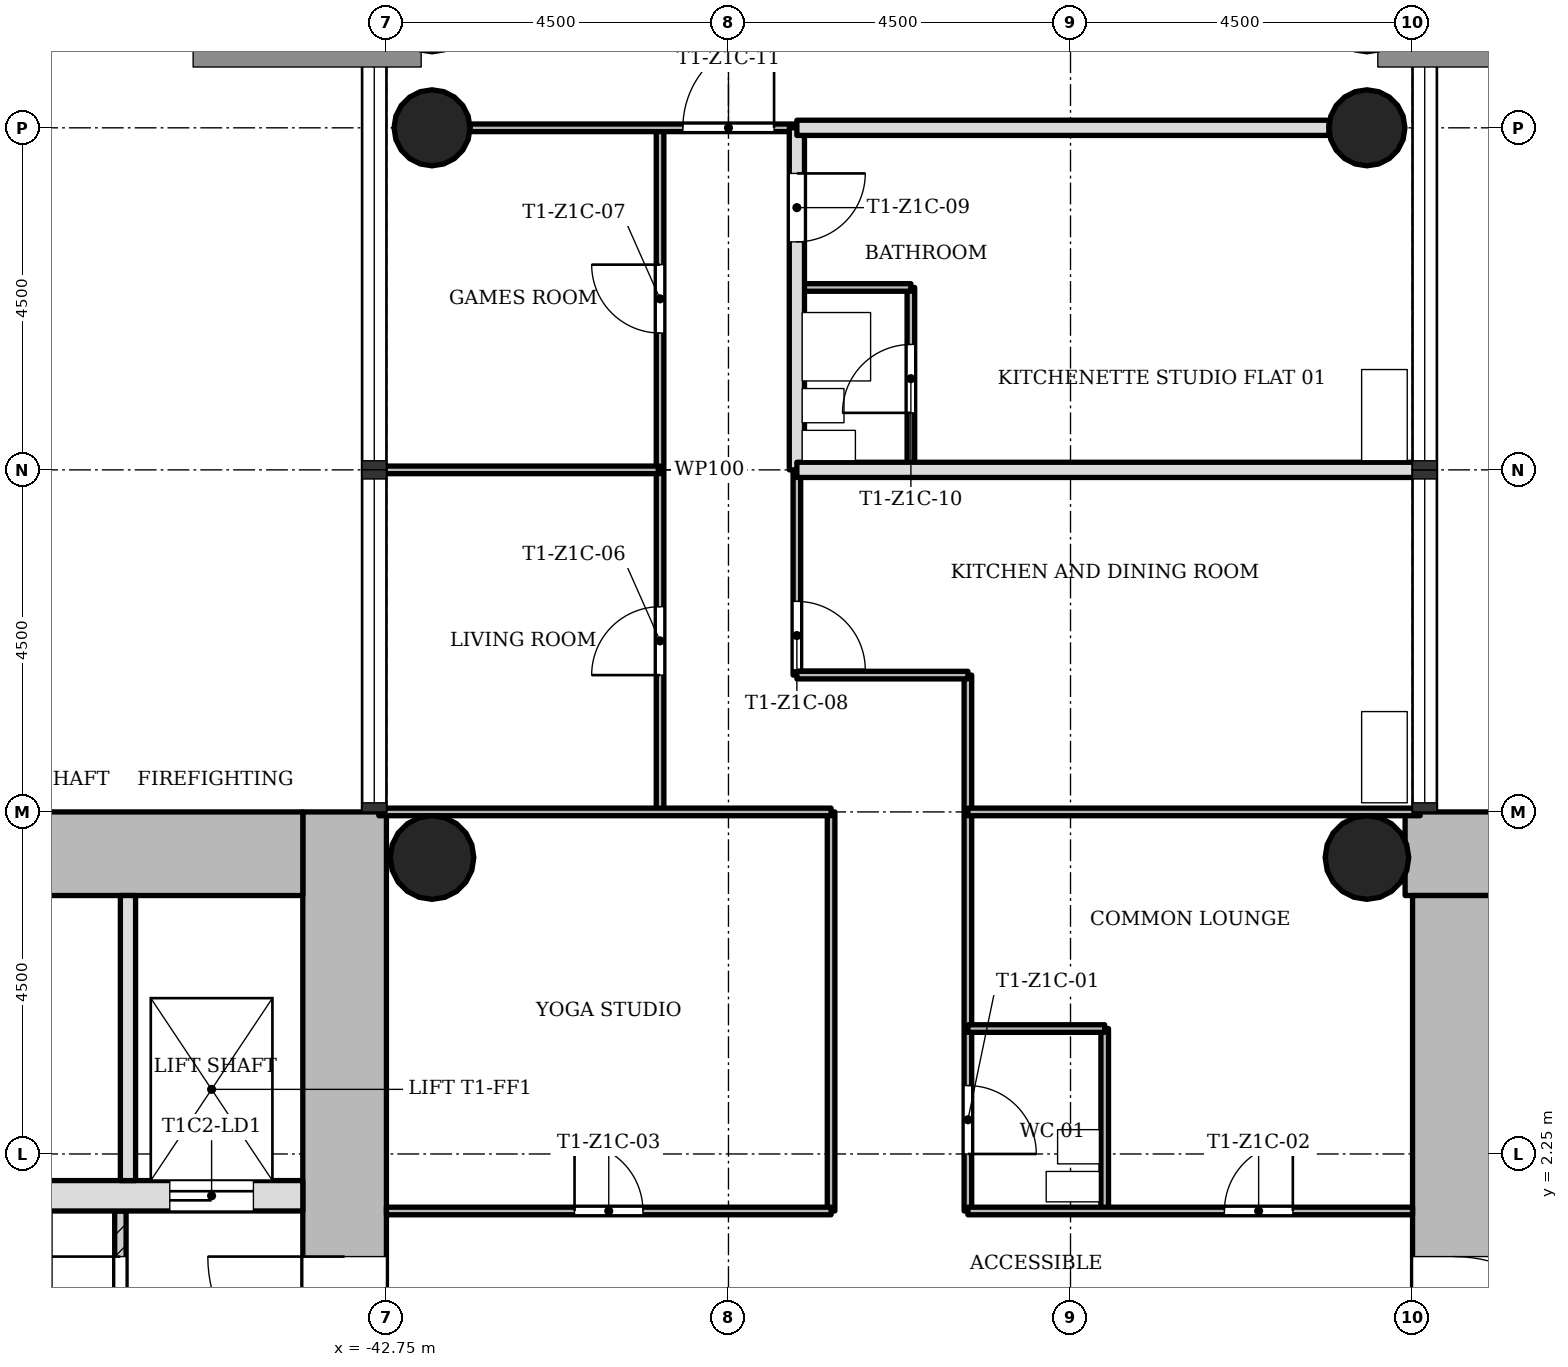
"""IFC4 building model, lengths in metres.
Left out: names, types, materials, properties, quantities, classifications, styles, units other than length and angle.
Written with IfcOpenShell. Run it as: python <this file> out.ifc"""

import sys

from ifc_helpers import new_model, si_unit, direction, frame, frame_2d, origin, origin_2d, place, context, subcontext, project, spatial, rectangle, hollow_circle, extrude, element, fill, save


model = new_model("IFC4")
c1 = context("Model", 3, precision=1e-05, world=origin(), true_north=direction((0.0, 1.0)))
c2 = subcontext(c1, "Body", "Model", "MODEL_VIEW")
j1 = project(units=[si_unit("LENGTHUNIT", "METRE"), si_unit("PLANEANGLEUNIT", "RADIAN")], contexts=[c1])
p1 = place(None, origin())
s1 = spatial("IfcSite", under=j1, at=p1, CompositionType="ELEMENT")
p2 = place(p1, origin())
s2 = spatial("IfcBuilding", under=s1, at=p2, CompositionType="ELEMENT")
p3 = place(p2, frame((0.0, 0.0, 44.9)))
s3 = spatial("IfcBuildingStorey", under=s2, at=p3, CompositionType="ELEMENT", Elevation=44.9)
p4 = place(p3, frame((-21.35, 6.2, 0.0), z_axis=(0.0, 0.0, 1.0), x_axis=(-1.0, 0.0, 0.0)))
e1 = element("IfcWall", 1, at=p4, inside=s3, PredefinedType="SHEAR", context=c2, shape_type="SweptSolid", body=[
    extrude(rectangle(XDim=7.998, YDim=1.1, at=frame_2d((3.999, 0.0))), origin(), (0.0, 0.0, 1.0), 3.4),
])
p5 = place(p3, frame((-28.7, 5.65, 0.0), z_axis=(0.0, 0.0, 1.0), x_axis=(0.0, -1.0, 0.0)))
e2 = element("IfcWall", 2, at=p5, inside=s3, PredefinedType="SHEAR", context=c2, shape_type="SweptSolid", body=[
    extrude(rectangle(XDim=12.4, YDim=1.1, at=frame_2d((6.2, 0.0))), origin(), (0.0, 0.0, 1.0), 3.4),
])
p6 = place(p5, frame((4.75, 0.0, 0.0)))
e3 = element("IfcOpeningElement", 3, at=p6, cuts=e2, PredefinedType="OPENING", context=c2, shape_type="SweptSolid", body=[
    extrude(rectangle(XDim=1.8, YDim=2.1, at=frame_2d((0.9, 1.05))), frame((0.0, 0.56, 0.0), z_axis=(0.0, -1.0, 0.0), x_axis=(1.0, 0.0, 0.0)), (0.0, 0.0, 1.0), 1.12),
])
p7 = place(p3, frame((-43.3, -5.65, 0.0), z_axis=(0.0, 0.0, 1.0), x_axis=(0.0, 1.0, 0.0)))
e4 = element("IfcWall", 4, at=p7, inside=s3, PredefinedType="SHEAR", context=c2, shape_type="SweptSolid", body=[
    extrude(rectangle(XDim=12.4, YDim=1.1, at=frame_2d((6.2, 0.0))), origin(), (0.0, 0.0, 1.0), 3.4),
])
p8 = place(p7, frame((4.75, 0.0, 0.0)))
e5 = element("IfcOpeningElement", 5, at=p8, cuts=e4, PredefinedType="OPENING", context=c2, shape_type="SweptSolid", body=[
    extrude(rectangle(XDim=1.8, YDim=2.1, at=frame_2d((0.9, 1.05))), frame((0.0, 0.56, 0.0), z_axis=(0.0, -1.0, 0.0), x_axis=(1.0, 0.0, 0.0)), (0.0, 0.0, 1.0), 1.12),
])
p9 = place(p3, frame((-43.85, 6.2, 0.0), z_axis=(0.0, 0.0, 1.0), x_axis=(-1.0, 0.0, 0.0)))
e6 = element("IfcWall", 6, at=p9, inside=s3, PredefinedType="SHEAR", context=c2, shape_type="SweptSolid", body=[
    extrude(rectangle(XDim=7.9, YDim=1.1, at=frame_2d((3.95, 0.0))), origin(), (0.0, 0.0, 1.0), 3.4),
])
p10 = place(p3, frame((-50.65, 1.7, 0.0), z_axis=(0.0, 0.0, 1.0), x_axis=(1.0, 0.0, 0.0)))
e7 = element("IfcWall", 7, at=p10, inside=s3, PredefinedType="SHEAR", context=c2, shape_type="SweptSolid", body=[
    extrude(rectangle(XDim=6.8, YDim=0.4, at=frame_2d((3.4, 0.0))), origin(), (0.0, 0.0, 1.0), 3.4),
])
p11 = place(p10, frame((5.05, 0.0, 0.0)))
e8 = element("IfcOpeningElement", 8, at=p11, cuts=e7, PredefinedType="OPENING", context=c2, shape_type="SweptSolid", body=[
    extrude(rectangle(XDim=1.1, YDim=2.1, at=frame_2d((0.55, 1.05))), frame((0.0, 0.21, 0.0), z_axis=(0.0, -1.0, 0.0), x_axis=(1.0, 0.0, 0.0)), (0.0, 0.0, 1.0), 0.42),
])
for number, where, z_axis, x_axis in (
    (9, (-29.85, 15.75, 0.0), (0.0, 0.0, 1.0), (1.0, 0.0, 0.0)),
    (10, (-42.15, 15.75, 0.0), (0.0, 0.0, 1.0), (1.0, 0.0, 0.0)),
):
    element("IfcColumn", number, at=place(p3, frame(where, z_axis=z_axis, x_axis=x_axis)), inside=s3, PredefinedType="COLUMN", context=c2, shape_type="SweptSolid", body=[
        extrude(hollow_circle(Radius=0.5, WallThickness=0.036, at=origin_2d()), origin(), (0.0, 0.0, 1.0), 3.4),
    ])
for number, where, z_axis, x_axis in (
    (11, (-29.85, 6.15, 0.0), (0.0, 0.0, 1.0), (1.0, 0.0, 0.0)),
    (12, (-42.15, 6.15, 0.0), (0.0, 0.0, 1.0), (1.0, 0.0, 0.0)),
):
    element("IfcColumn", number, at=place(p3, frame(where, z_axis=z_axis, x_axis=x_axis)), inside=s3, PredefinedType="COLUMN", context=c2, shape_type="SweptSolid", body=[
        extrude(hollow_circle(Radius=0.55, WallThickness=0.04, at=origin_2d()), origin(), (0.0, 0.0, 1.0), 3.4),
    ])
p12 = place(p3, frame((-46.25, 1.5, 0.0), z_axis=(0.0, 0.0, 1.0), x_axis=(0.0, -1.0, 0.0)))
e13 = element("IfcWall", 13, at=p12, inside=s3, PredefinedType="PARTITIONING", context=c2, shape_type="SweptSolid", body=[
    extrude(rectangle(XDim=3.0, YDim=0.15, at=frame_2d((1.5, 0.0))), origin(), (0.0, 0.0, 1.0), 3.0),
])
p13 = place(p12, frame((0.6, 0.0, 0.0)))
e14 = element("IfcOpeningElement", 14, at=p13, cuts=e13, PredefinedType="OPENING", context=c2, shape_type="SweptSolid", body=[
    extrude(rectangle(XDim=1.8, YDim=2.1, at=frame_2d((0.9, 1.05))), frame((0.0, 0.085, 0.0), z_axis=(0.0, -1.0, 0.0), x_axis=(1.0, 0.0, 0.0)), (0.0, 0.0, 1.0), 0.17),
])
p14 = place(p3, frame((-46.15, 5.65, 0.0), z_axis=(0.0, 0.0, 1.0), x_axis=(0.0, -1.0, 0.0)))
e15 = element("IfcWall", 15, at=p14, inside=s3, PredefinedType="SOLIDWALL", context=c2, shape_type="SweptSolid", body=[
    extrude(rectangle(XDim=3.75, YDim=0.2, at=frame_2d((1.875, 0.0))), origin(), (0.0, 0.0, 1.0), 3.0),
])
p15 = place(p3, frame((-39.15, 6.75, 0.0), z_axis=(0.0, 0.0, 1.0), x_axis=(0.0, 1.0, 0.0)))
e16 = element("IfcWall", 16, at=p15, inside=s3, PredefinedType="PARTITIONING", context=c2, shape_type="SweptSolid", body=[
    extrude(rectangle(XDim=9.0, YDim=0.1, at=frame_2d((4.5, 0.0))), origin(), (0.0, 0.0, 1.0), 3.0),
])
p16 = place(p15, frame((1.8, 0.0, 0.0)))
e17 = element("IfcOpeningElement", 17, at=p16, cuts=e16, PredefinedType="OPENING", context=c2, shape_type="SweptSolid", body=[
    extrude(rectangle(XDim=0.9, YDim=2.1, at=frame_2d((0.45, 1.05))), frame((0.0, 0.06, 0.0), z_axis=(0.0, -1.0, 0.0), x_axis=(1.0, 0.0, 0.0)), (0.0, 0.0, 1.0), 0.12),
])
p17 = place(p15, frame((6.3, 0.0, 0.0)))
e18 = element("IfcOpeningElement", 18, at=p17, cuts=e16, PredefinedType="OPENING", context=c2, shape_type="SweptSolid", body=[
    extrude(rectangle(XDim=0.9, YDim=2.1, at=frame_2d((0.45, 1.05))), frame((0.0, 0.06, 0.0), z_axis=(0.0, -1.0, 0.0), x_axis=(1.0, 0.0, 0.0)), (0.0, 0.0, 1.0), 0.12),
])
p18 = place(p3, frame((-37.35, 8.55, 0.0), z_axis=(0.0, 0.0, 1.0), x_axis=(0.0, 1.0, 0.0)))
e19 = element("IfcWall", 19, at=p18, inside=s3, PredefinedType="PARTITIONING", context=c2, shape_type="SweptSolid", body=[
    extrude(rectangle(XDim=2.7, YDim=0.1, at=frame_2d((1.35, 0.0))), origin(), (0.0, 0.0, 1.0), 3.0),
])
p19 = place(p18, frame((0.07, 0.0, 0.0)))
e20 = element("IfcOpeningElement", 20, at=p19, cuts=e19, PredefinedType="OPENING", context=c2, shape_type="SweptSolid", body=[
    extrude(rectangle(XDim=0.9, YDim=2.1, at=frame_2d((0.45, 1.05))), frame((0.0, 0.06, 0.0), z_axis=(0.0, -1.0, 0.0), x_axis=(1.0, 0.0, 0.0)), (0.0, 0.0, 1.0), 0.12),
])
p20 = place(p3, frame((-37.35, 11.25, 0.0), z_axis=(0.0, 0.0, 1.0), x_axis=(0.0, 1.0, 0.0)))
e21 = element("IfcWall", 21, at=p20, inside=s3, PredefinedType="SOLIDWALL", context=c2, shape_type="SweptSolid", body=[
    extrude(rectangle(XDim=4.5, YDim=0.2, at=frame_2d((2.25, 0.0))), origin(), (0.0, 0.0, 1.0), 3.0),
])
p21 = place(p20, frame((3.0, 0.0, 0.0)))
e22 = element("IfcOpeningElement", 22, at=p21, cuts=e21, PredefinedType="OPENING", context=c2, shape_type="SweptSolid", body=[
    extrude(rectangle(XDim=0.9, YDim=2.1, at=frame_2d((0.45, 1.05))), frame((0.0, 0.11, 0.0), z_axis=(0.0, -1.0, 0.0), x_axis=(1.0, 0.0, 0.0)), (0.0, 0.0, 1.0), 0.22),
])
p22 = place(p3, frame((-36.9, 1.5, 0.0), z_axis=(0.0, 0.0, 1.0), x_axis=(0.0, 1.0, 0.0)))
e23 = element("IfcWall", 23, at=p22, inside=s3, PredefinedType="PARTITIONING", context=c2, shape_type="SweptSolid", body=[
    extrude(rectangle(XDim=5.25, YDim=0.1, at=frame_2d((2.625, 0.0))), origin(), (0.0, 0.0, 1.0), 3.0),
])
p23 = place(p3, frame((-35.85, 11.25, 0.0), z_axis=(0.0, 0.0, 1.0), x_axis=(0.0, 1.0, 0.0)))
e24 = element("IfcWall", 24, at=p23, inside=s3, PredefinedType="PARTITIONING", context=c2, shape_type="SweptSolid", body=[
    extrude(rectangle(XDim=2.4, YDim=0.1, at=frame_2d((1.2, 0.0))), origin(), (0.0, 0.0, 1.0), 3.0),
])
p24 = place(p23, frame((0.75, 0.0, 0.0)))
e25 = element("IfcOpeningElement", 25, at=p24, cuts=e24, PredefinedType="OPENING", context=c2, shape_type="SweptSolid", body=[
    extrude(rectangle(XDim=0.9, YDim=2.1, at=frame_2d((0.45, 1.05))), frame((0.0, 0.06, 0.0), z_axis=(0.0, -1.0, 0.0), x_axis=(1.0, 0.0, 0.0)), (0.0, 0.0, 1.0), 0.12),
])
p25 = place(p3, frame((-35.1, 1.5, 0.0), z_axis=(0.0, 0.0, 1.0), x_axis=(0.0, 1.0, 0.0)))
e26 = element("IfcWall", 26, at=p25, inside=s3, PredefinedType="PARTITIONING", context=c2, shape_type="SweptSolid", body=[
    extrude(rectangle(XDim=7.05, YDim=0.1, at=frame_2d((3.525, 0.0))), origin(), (0.0, 0.0, 1.0), 3.0),
])
p26 = place(p25, frame((0.75, 0.0, 0.0)))
e27 = element("IfcOpeningElement", 27, at=p26, cuts=e26, PredefinedType="OPENING", context=c2, shape_type="SweptSolid", body=[
    extrude(rectangle(XDim=0.9, YDim=2.1, at=frame_2d((0.45, 1.05))), frame((0.0, 0.06, 0.0), z_axis=(0.0, -1.0, 0.0), x_axis=(1.0, 0.0, 0.0)), (0.0, 0.0, 1.0), 0.12),
])
p27 = place(p3, frame((-33.3, 1.5, 0.0), z_axis=(0.0, 0.0, 1.0), x_axis=(0.0, 1.0, 0.0)))
e28 = element("IfcWall", 28, at=p27, inside=s3, PredefinedType="PARTITIONING", context=c2, shape_type="SweptSolid", body=[
    extrude(rectangle(XDim=2.4, YDim=0.1, at=frame_2d((1.2, 0.0))), origin(), (0.0, 0.0, 1.0), 3.0),
])
p28 = place(p3, frame((-42.75, 1.5, 0.0), z_axis=(0.0, 0.0, 1.0), x_axis=(1.0, 0.0, 0.0)))
e29 = element("IfcWall", 29, at=p28, inside=s3, PredefinedType="PARTITIONING", context=c2, shape_type="SweptSolid", body=[
    extrude(rectangle(XDim=5.85, YDim=0.1, at=frame_2d((2.925, 0.0))), origin(), (0.0, 0.0, 1.0), 3.0),
])
p29 = place(p28, frame((2.475, 0.0, 0.0)))
e30 = element("IfcOpeningElement", 30, at=p29, cuts=e29, PredefinedType="OPENING", context=c2, shape_type="SweptSolid", body=[
    extrude(rectangle(XDim=0.9, YDim=2.1, at=frame_2d((0.45, 1.05))), frame((0.0, 0.06, 0.0), z_axis=(0.0, -1.0, 0.0), x_axis=(1.0, 0.0, 0.0)), (0.0, 0.0, 1.0), 0.12),
])
p30 = place(p3, frame((-35.1, 1.5, 0.0), z_axis=(0.0, 0.0, 1.0), x_axis=(1.0, 0.0, 0.0)))
e31 = element("IfcWall", 31, at=p30, inside=s3, PredefinedType="PARTITIONING", context=c2, shape_type="SweptSolid", body=[
    extrude(rectangle(XDim=5.85, YDim=0.1, at=frame_2d((2.925, 0.0))), origin(), (0.0, 0.0, 1.0), 3.0),
])
p31 = place(p30, frame((3.375, 0.0, 0.0)))
e32 = element("IfcOpeningElement", 32, at=p31, cuts=e31, PredefinedType="OPENING", context=c2, shape_type="SweptSolid", body=[
    extrude(rectangle(XDim=0.9, YDim=2.1, at=frame_2d((0.45, 1.05))), frame((0.0, 0.06, 0.0), z_axis=(0.0, -1.0, 0.0), x_axis=(1.0, 0.0, 0.0)), (0.0, 0.0, 1.0), 0.12),
])
p32 = place(p3, frame((-35.1, 3.9, 0.0), z_axis=(0.0, 0.0, 1.0), x_axis=(1.0, 0.0, 0.0)))
e33 = element("IfcWall", 33, at=p32, inside=s3, PredefinedType="PARTITIONING", context=c2, shape_type="SweptSolid", body=[
    extrude(rectangle(XDim=1.8, YDim=0.1, at=frame_2d((0.9, 0.0))), origin(), (0.0, 0.0, 1.0), 3.0),
])
for number, where, z_axis, x_axis in (
    (34, (-42.85, 6.75, 0.0), (0.0, 0.0, 1.0), (1.0, 0.0, 0.0)),
    (35, (-35.1, 6.75, 0.0), (0.0, 0.0, 1.0), (1.0, 0.0, 0.0)),
):
    element("IfcWall", number, at=place(p3, frame(where, z_axis=z_axis, x_axis=x_axis)), inside=s3, PredefinedType="PARTITIONING", context=c2, shape_type="SweptSolid", body=[
        extrude(rectangle(XDim=5.95, YDim=0.1, at=frame_2d((2.975, 0.0))), origin(), (0.0, 0.0, 1.0), 3.0),
    ])
p33 = place(p3, frame((-37.35, 8.55, 0.0), z_axis=(0.0, 0.0, 1.0), x_axis=(1.0, 0.0, 0.0)))
e36 = element("IfcWall", 36, at=p33, inside=s3, PredefinedType="PARTITIONING", context=c2, shape_type="SweptSolid", body=[
    extrude(rectangle(XDim=2.25, YDim=0.1, at=frame_2d((1.125, 0.0))), origin(), (0.0, 0.0, 1.0), 3.0),
])
p34 = place(p3, frame((-42.85, 11.25, 0.0), z_axis=(0.0, 0.0, 1.0), x_axis=(1.0, 0.0, 0.0)))
e37 = element("IfcWall", 37, at=p34, inside=s3, PredefinedType="PARTITIONING", context=c2, shape_type="SweptSolid", body=[
    extrude(rectangle(XDim=3.7, YDim=0.1, at=frame_2d((1.85, 0.0))), origin(), (0.0, 0.0, 1.0), 3.0),
])
p35 = place(p3, frame((-37.35, 11.25, 0.0), z_axis=(0.0, 0.0, 1.0), x_axis=(1.0, 0.0, 0.0)))
e38 = element("IfcWall", 38, at=p35, inside=s3, PredefinedType="SOLIDWALL", context=c2, shape_type="SweptSolid", body=[
    extrude(rectangle(XDim=8.2, YDim=0.2, at=frame_2d((4.1, 0.0))), origin(), (0.0, 0.0, 1.0), 3.0),
])
p36 = place(p3, frame((-37.35, 13.65, 0.0), z_axis=(0.0, 0.0, 1.0), x_axis=(1.0, 0.0, 0.0)))
e39 = element("IfcWall", 39, at=p36, inside=s3, PredefinedType="PARTITIONING", context=c2, shape_type="SweptSolid", body=[
    extrude(rectangle(XDim=1.5, YDim=0.1, at=frame_2d((0.75, 0.0))), origin(), (0.0, 0.0, 1.0), 3.0),
])
p37 = place(p3, frame((-41.65, 15.75, 0.0), z_axis=(0.0, 0.0, 1.0), x_axis=(1.0, 0.0, 0.0)))
e40 = element("IfcWall", 40, at=p37, inside=s3, PredefinedType="PARTITIONING", context=c2, shape_type="SweptSolid", body=[
    extrude(rectangle(XDim=4.3, YDim=0.1, at=frame_2d((2.15, 0.0))), origin(), (0.0, 0.0, 1.0), 3.0),
])
p38 = place(p37, frame((2.8, 0.0, 0.0)))
e41 = element("IfcOpeningElement", 41, at=p38, cuts=e40, PredefinedType="OPENING", context=c2, shape_type="SweptSolid", body=[
    extrude(rectangle(XDim=1.2, YDim=2.1, at=frame_2d((0.6, 1.05))), frame((0.0, 0.06, 0.0), z_axis=(0.0, -1.0, 0.0), x_axis=(1.0, 0.0, 0.0)), (0.0, 0.0, 1.0), 0.12),
])
p39 = place(p3, frame((-37.35, 15.75, 0.0), z_axis=(0.0, 0.0, 1.0), x_axis=(1.0, 0.0, 0.0)))
e42 = element("IfcWall", 42, at=p39, inside=s3, PredefinedType="SOLIDWALL", context=c2, shape_type="SweptSolid", body=[
    extrude(rectangle(XDim=7.0, YDim=0.2, at=frame_2d((3.5, 0.0))), origin(), (0.0, 0.0, 1.0), 3.0),
])
p40 = place(p13, origin())
e43 = element("IfcDoor", 43, at=p40, inside=s3, OperationType="SINGLE_SWING_LEFT", PredefinedType="DOOR", context=c2, shape_type="SweptSolid", body=[
    extrude(rectangle(XDim=1.8, YDim=2.1, at=frame_2d((0.9, 1.05))), frame((0.0, 0.025, 0.0), z_axis=(0.0, -1.0, 0.0), x_axis=(1.0, 0.0, 0.0)), (0.0, 0.0, 1.0), 0.05),
])
fill(e14, e43)
p41 = place(p26, origin())
e44 = element("IfcDoor", 44, at=p41, inside=s3, OperationType="SINGLE_SWING_LEFT", PredefinedType="DOOR", context=c2, shape_type="SweptSolid", body=[
    extrude(rectangle(XDim=0.9, YDim=2.1, at=frame_2d((0.45, 1.05))), frame((0.0, 0.025, 0.0), z_axis=(0.0, -1.0, 0.0), x_axis=(1.0, 0.0, 0.0)), (0.0, 0.0, 1.0), 0.05),
])
fill(e27, e44)
p42 = place(p31, origin())
e45 = element("IfcDoor", 45, at=p42, inside=s3, OperationType="SINGLE_SWING_LEFT", PredefinedType="DOOR", context=c2, shape_type="SweptSolid", body=[
    extrude(rectangle(XDim=0.9, YDim=2.1, at=frame_2d((0.45, 1.05))), frame((0.0, 0.025, 0.0), z_axis=(0.0, -1.0, 0.0), x_axis=(1.0, 0.0, 0.0)), (0.0, 0.0, 1.0), 0.05),
])
fill(e32, e45)
p43 = place(p29, origin())
e46 = element("IfcDoor", 46, at=p43, inside=s3, OperationType="SINGLE_SWING_RIGHT", PredefinedType="DOOR", context=c2, shape_type="SweptSolid", body=[
    extrude(rectangle(XDim=0.9, YDim=2.1, at=frame_2d((0.45, 1.05))), frame((0.0, 0.025, 0.0), z_axis=(0.0, -1.0, 0.0), x_axis=(1.0, 0.0, 0.0)), (0.0, 0.0, 1.0), 0.05),
])
fill(e30, e46)
p44 = place(p16, origin())
e47 = element("IfcDoor", 47, at=p44, inside=s3, OperationType="SINGLE_SWING_RIGHT", PredefinedType="DOOR", context=c2, shape_type="SweptSolid", body=[
    extrude(rectangle(XDim=0.9, YDim=2.1, at=frame_2d((0.45, 1.05))), frame((0.0, 0.025, 0.0), z_axis=(0.0, -1.0, 0.0), x_axis=(1.0, 0.0, 0.0)), (0.0, 0.0, 1.0), 0.05),
])
fill(e17, e47)
p45 = place(p17, origin())
e48 = element("IfcDoor", 48, at=p45, inside=s3, OperationType="SINGLE_SWING_LEFT", PredefinedType="DOOR", context=c2, shape_type="SweptSolid", body=[
    extrude(rectangle(XDim=0.9, YDim=2.1, at=frame_2d((0.45, 1.05))), frame((0.0, 0.025, 0.0), z_axis=(0.0, -1.0, 0.0), x_axis=(1.0, 0.0, 0.0)), (0.0, 0.0, 1.0), 0.05),
])
fill(e18, e48)
p46 = place(p19, origin())
e49 = element("IfcDoor", 49, at=p46, inside=s3, OperationType="SINGLE_SWING_LEFT", PredefinedType="DOOR", context=c2, shape_type="SweptSolid", body=[
    extrude(rectangle(XDim=0.9, YDim=2.1, at=frame_2d((0.45, 1.05))), frame((0.0, 0.025, 0.0), z_axis=(0.0, -1.0, 0.0), x_axis=(1.0, 0.0, 0.0)), (0.0, 0.0, 1.0), 0.05),
])
fill(e20, e49)
p47 = place(p21, origin())
e50 = element("IfcDoor", 50, at=p47, inside=s3, OperationType="SINGLE_SWING_RIGHT", PredefinedType="DOOR", context=c2, shape_type="SweptSolid", body=[
    extrude(rectangle(XDim=0.9, YDim=2.1, at=frame_2d((0.45, 1.05))), frame((0.0, 0.025, 0.0), z_axis=(0.0, -1.0, 0.0), x_axis=(1.0, 0.0, 0.0)), (0.0, 0.0, 1.0), 0.05),
])
fill(e22, e50)
p48 = place(p24, origin())
e51 = element("IfcDoor", 51, at=p48, inside=s3, OperationType="SINGLE_SWING_RIGHT", PredefinedType="DOOR", context=c2, shape_type="SweptSolid", body=[
    extrude(rectangle(XDim=0.9, YDim=2.1, at=frame_2d((0.45, 1.05))), frame((0.0, 0.025, 0.0), z_axis=(0.0, -1.0, 0.0), x_axis=(1.0, 0.0, 0.0)), (0.0, 0.0, 1.0), 0.05),
])
fill(e25, e51)
p49 = place(p38, origin())
e52 = element("IfcDoor", 52, at=p49, inside=s3, OperationType="SINGLE_SWING_LEFT", PredefinedType="DOOR", context=c2, shape_type="SweptSolid", body=[
    extrude(rectangle(XDim=1.2, YDim=2.1, at=frame_2d((0.6, 1.05))), frame((0.0, 0.025, 0.0), z_axis=(0.0, -1.0, 0.0), x_axis=(1.0, 0.0, 0.0)), (0.0, 0.0, 1.0), 0.05),
])
fill(e41, e52)
p50 = place(p6, origin())
e53 = element("IfcDoor", 53, at=p50, inside=s3, OperationType="SINGLE_SWING_LEFT", PredefinedType="DOOR", context=c2, shape_type="SweptSolid", body=[
    extrude(rectangle(XDim=1.8, YDim=2.1, at=frame_2d((0.9, 1.05))), frame((0.0, 0.025, 0.0), z_axis=(0.0, -1.0, 0.0), x_axis=(1.0, 0.0, 0.0)), (0.0, 0.0, 1.0), 0.05),
])
fill(e3, e53)
p51 = place(p11, origin())
e54 = element("IfcDoor", 54, at=p51, inside=s3, OperationType="SLIDING_TO_LEFT", PredefinedType="DOOR", context=c2, shape_type="SweptSolid", body=[
    extrude(rectangle(XDim=1.1, YDim=2.1, at=frame_2d((0.55, 1.05))), frame((0.0, 0.025, 0.0), z_axis=(0.0, -1.0, 0.0), x_axis=(1.0, 0.0, 0.0)), (0.0, 0.0, 1.0), 0.05),
])
fill(e8, e54)
p52 = place(p8, origin())
e55 = element("IfcDoor", 55, at=p52, inside=s3, OperationType="SINGLE_SWING_LEFT", PredefinedType="DOOR", context=c2, shape_type="SweptSolid", body=[
    extrude(rectangle(XDim=1.8, YDim=2.1, at=frame_2d((0.9, 1.05))), frame((0.0, 0.025, 0.0), z_axis=(0.0, -1.0, 0.0), x_axis=(1.0, 0.0, 0.0)), (0.0, 0.0, 1.0), 0.05),
])
fill(e5, e55)
save(model, sys.argv[1])
